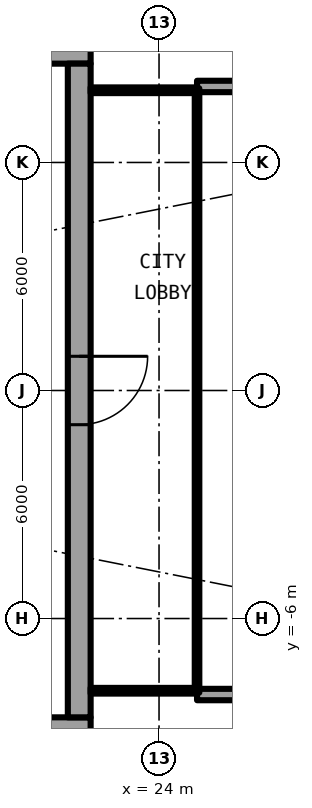
"""IFC4 building model, lengths in metres.
Left out: names, types, materials, properties, quantities, classifications, styles, units other than length and angle.
Written with IfcOpenShell. Run it as: python <this file> out.ifc"""

import sys

from ifc_helpers import new_model, si_unit, direction, frame, frame_2d, origin, place, context, subcontext, project, spatial, rectangle, extrude, element, fill, save


model = new_model("IFC4")
c1 = context("Model", 3, precision=1e-05, world=origin(), true_north=direction((0.0, 1.0)))
c2 = subcontext(c1, "Body", "Model", "MODEL_VIEW")
j1 = project(units=[si_unit("LENGTHUNIT", "METRE"), si_unit("PLANEANGLEUNIT", "RADIAN")], contexts=[c1])
p1 = place(None, origin())
s1 = spatial("IfcSite", under=j1, at=p1, CompositionType="ELEMENT")
p2 = place(p1, origin())
s2 = spatial("IfcBuilding", under=s1, at=p2, CompositionType="ELEMENT")
p3 = place(p2, frame((0.0, 0.0, 117.75)))
s3 = spatial("IfcBuildingStorey", under=s2, at=p3, CompositionType="ELEMENT", Elevation=117.75)
for number, where, z_axis, x_axis in (
    (1, (25.0, 8.0, 0.0), (0.0, 0.0, 1.0), (1.0, 0.0, 0.0)),
    (2, (25.0, -8.0, 0.0), (0.0, 0.0, 1.0), (1.0, 0.0, 0.0)),
):
    element("IfcWall", number, at=place(p3, frame(where, z_axis=z_axis, x_axis=x_axis)), inside=s3, PredefinedType="SOLIDWALL", context=c2, shape_type="SweptSolid", body=[
        extrude(rectangle(XDim=2.667, YDim=0.3, at=frame_2d((1.333, 0.0))), origin(), (0.0, 0.0, 1.0), 2.7),
    ])
p4 = place(p3, frame((22.2, 8.9, 0.0), z_axis=(0.0, 0.0, 1.0), x_axis=(-1.0, 0.0, 0.0)))
e3 = element("IfcWall", 3, at=p4, inside=s3, PredefinedType="SHEAR", context=c2, shape_type="SweptSolid", body=[
    extrude(rectangle(XDim=13.8, YDim=0.6, at=frame_2d((6.9, 0.0))), origin(), (0.0, 0.0, 1.0), 3.05),
])
p5 = place(p4, frame((1.125, 0.0, 0.0)))
e4 = element("IfcOpeningElement", 4, at=p5, cuts=e3, PredefinedType="OPENING", context=c2, shape_type="SweptSolid", body=[
    extrude(rectangle(XDim=1.2, YDim=2.3, at=frame_2d((0.6, 1.15))), frame((0.0, 0.31, 0.0), z_axis=(0.0, -1.0, 0.0), x_axis=(1.0, 0.0, 0.0)), (0.0, 0.0, 1.0), 0.62),
])
p6 = place(p3, frame((8.4, -8.9, 0.0), z_axis=(0.0, 0.0, 1.0), x_axis=(1.0, 0.0, 0.0)))
e5 = element("IfcWall", 5, at=p6, inside=s3, PredefinedType="SHEAR", context=c2, shape_type="SweptSolid", body=[
    extrude(rectangle(XDim=13.8, YDim=0.6, at=frame_2d((6.9, 0.0))), origin(), (0.0, 0.0, 1.0), 3.05),
])
p7 = place(p6, frame((11.475, 0.0, 0.0)))
e6 = element("IfcOpeningElement", 6, at=p7, cuts=e5, PredefinedType="OPENING", context=c2, shape_type="SweptSolid", body=[
    extrude(rectangle(XDim=1.2, YDim=2.3, at=frame_2d((0.6, 1.15))), frame((0.0, 0.31, 0.0), z_axis=(0.0, -1.0, 0.0), x_axis=(1.0, 0.0, 0.0)), (0.0, 0.0, 1.0), 0.62),
])
p8 = place(p3, frame((21.9, 8.6, 0.0), z_axis=(0.0, 0.0, 1.0), x_axis=(0.0, -1.0, 0.0)))
e7 = element("IfcWall", 7, at=p8, inside=s3, PredefinedType="SHEAR", context=c2, shape_type="SweptSolid", body=[
    extrude(rectangle(XDim=17.2, YDim=0.6, at=frame_2d((8.6, 0.0))), origin(), (0.0, 0.0, 1.0), 3.05),
])
p9 = place(p8, frame((7.7, 0.0, 0.0)))
e8 = element("IfcOpeningElement", 8, at=p9, cuts=e7, PredefinedType="OPENING", context=c2, shape_type="SweptSolid", body=[
    extrude(rectangle(XDim=1.8, YDim=2.3, at=frame_2d((0.9, 1.15))), frame((0.0, 0.31, 0.0), z_axis=(0.0, -1.0, 0.0), x_axis=(1.0, 0.0, 0.0)), (0.0, 0.0, 1.0), 0.62),
])
for number, where, z_axis, x_axis in (
    (9, (22.2, -7.9, 0.0), (0.0, 0.0, 1.0), (1.0, 0.0, 0.0)),
    (10, (22.2, 7.9, 0.0), (0.0, 0.0, 1.0), (1.0, 0.0, 0.0)),
):
    element("IfcWall", number, at=place(p3, frame(where, z_axis=z_axis, x_axis=x_axis)), inside=s3, PredefinedType="PARTITIONING", context=c2, shape_type="SweptSolid", body=[
        extrude(rectangle(XDim=2.74, YDim=0.15, at=frame_2d((1.37, 0.0))), origin(), (0.0, 0.0, 1.0), 2.7),
    ])
p10 = place(p3, frame((25.0, -7.95, 0.0), z_axis=(0.0, 0.0, 1.0), x_axis=(0.0, 1.0, 0.0)))
e11 = element("IfcWall", 11, at=p10, inside=s3, PredefinedType="PARTITIONING", context=c2, shape_type="SweptSolid", body=[
    extrude(rectangle(XDim=15.9, YDim=0.12, at=frame_2d((7.95, 0.0))), origin(), (0.0, 0.0, 1.0), 2.7),
])
p11 = place(p10, frame((0.95, 0.0, 0.1)))
e12 = element("IfcOpeningElement", 12, at=p11, cuts=e11, PredefinedType="OPENING", context=c2, shape_type="SweptSolid", body=[
    extrude(rectangle(XDim=14.0, YDim=2.35, at=frame_2d((7.0, 1.175))), frame((0.0, 0.07, 0.0), z_axis=(0.0, -1.0, 0.0), x_axis=(1.0, 0.0, 0.0)), (0.0, 0.0, 1.0), 0.14),
])
p12 = place(p9, origin())
e13 = element("IfcDoor", 13, at=p12, inside=s3, OperationType="SINGLE_SWING_LEFT", PredefinedType="DOOR", context=c2, shape_type="SweptSolid", body=[
    extrude(rectangle(XDim=1.8, YDim=2.3, at=frame_2d((0.9, 1.15))), frame((0.0, 0.025, 0.0), z_axis=(0.0, -1.0, 0.0), x_axis=(1.0, 0.0, 0.0)), (0.0, 0.0, 1.0), 0.05),
])
fill(e8, e13)
p13 = place(p11, origin())
e14 = element("IfcWindow", 14, at=p13, inside=s3, PartitioningType="SINGLE_PANEL", PredefinedType="WINDOW", context=c2, shape_type="SweptSolid", body=[
    extrude(rectangle(XDim=14.0, YDim=2.35, at=frame_2d((7.0, 1.175))), frame((0.0, 0.03, 0.0), z_axis=(0.0, -1.0, 0.0), x_axis=(1.0, 0.0, 0.0)), (0.0, 0.0, 1.0), 0.06),
])
fill(e12, e14)
save(model, sys.argv[1])
